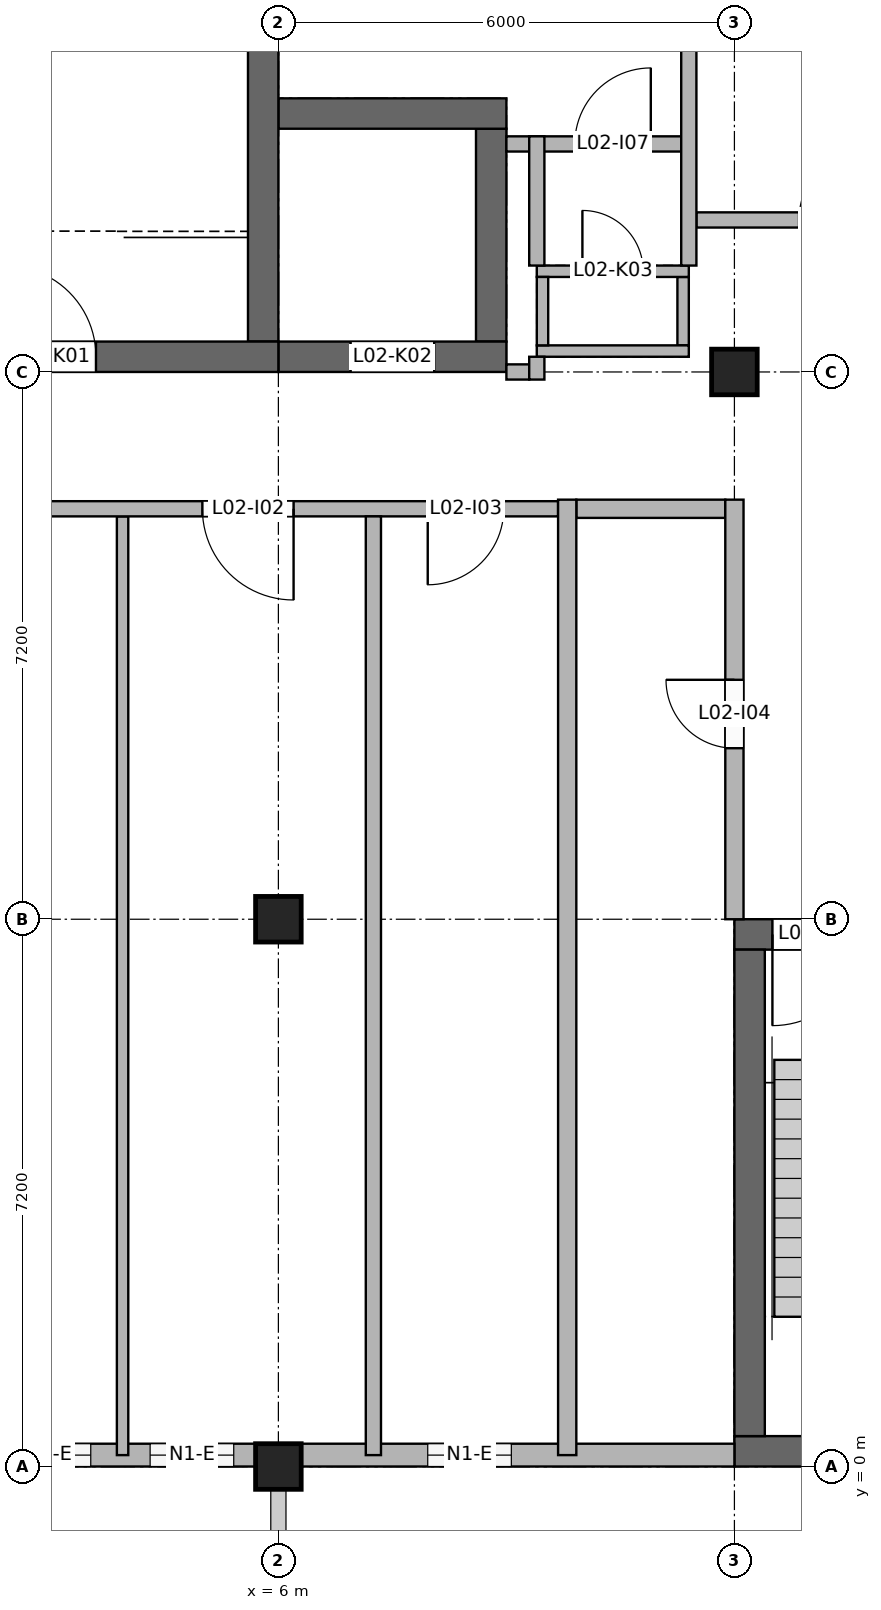
"""IFC4 building model, lengths in metres.
Left out: names, types, materials, properties, quantities, classifications, styles, units other than length and angle.
Written with IfcOpenShell. Run it as: python <this file> out.ifc"""

import sys

from ifc_helpers import new_model, si_unit, direction, frame, frame_2d, origin, origin_2d, place, context, subcontext, project, spatial, rectangle, extrude, element, fill, save


model = new_model("IFC4")
c1 = context("Model", 3, precision=1e-05, world=origin(), true_north=direction((0.0, 1.0)))
c2 = subcontext(c1, "Body", "Model", "MODEL_VIEW")
j1 = project(units=[si_unit("LENGTHUNIT", "METRE"), si_unit("PLANEANGLEUNIT", "RADIAN")], contexts=[c1])
p1 = place(None, origin())
s1 = spatial("IfcSite", under=j1, at=p1, CompositionType="ELEMENT")
p2 = place(p1, origin())
s2 = spatial("IfcBuilding", under=s1, at=p2, CompositionType="ELEMENT")
p3 = place(p2, frame((0.0, 0.0, 8.4)))
s3 = spatial("IfcBuildingStorey", under=s2, at=p3, CompositionType="ELEMENT", Elevation=8.4)
p4 = place(p3, frame((0.0, 14.6, 0.0), z_axis=(0.0, 0.0, 1.0), x_axis=(1.0, 0.0, 0.0)))
e1 = element("IfcWall", 1, at=p4, inside=s3, PredefinedType="SHEAR", context=c2, shape_type="SweptSolid", body=[
    extrude(rectangle(XDim=6.0, YDim=0.4, at=frame_2d((3.0, 0.0))), origin(), (0.0, 0.0, 1.0), 3.95),
])
p5 = place(p4, frame((2.4, 0.0, 0.0)))
e2 = element("IfcOpeningElement", 2, at=p5, cuts=e1, PredefinedType="OPENING", context=c2, shape_type="SweptSolid", body=[
    extrude(rectangle(XDim=1.2, YDim=2.1, at=frame_2d((0.6, 1.05))), frame((0.0, 0.21, 0.0), z_axis=(0.0, -1.0, 0.0), x_axis=(1.0, 0.0, 0.0)), (0.0, 0.0, 1.0), 0.42),
])
p6 = place(p3, frame((5.8, 14.8, 0.0), z_axis=(0.0, 0.0, 1.0), x_axis=(0.0, 1.0, 0.0)))
e3 = element("IfcWall", 3, at=p6, inside=s3, PredefinedType="SHEAR", context=c2, shape_type="SweptSolid", body=[
    extrude(rectangle(XDim=6.4, YDim=0.4, at=frame_2d((3.2, 0.0))), origin(), (0.0, 0.0, 1.0), 3.95),
])
p7 = place(p3, frame((6.0, 14.6, 0.0), z_axis=(0.0, 0.0, 1.0), x_axis=(1.0, 0.0, 0.0)))
e4 = element("IfcWall", 4, at=p7, inside=s3, PredefinedType="SHEAR", context=c2, shape_type="SweptSolid", body=[
    extrude(rectangle(XDim=3.0, YDim=0.4, at=frame_2d((1.5, 0.0))), origin(), (0.0, 0.0, 1.0), 5.75),
])
p8 = place(p7, frame((0.95, 0.0, 0.0)))
e5 = element("IfcOpeningElement", 5, at=p8, cuts=e4, PredefinedType="OPENING", context=c2, shape_type="SweptSolid", body=[
    extrude(rectangle(XDim=1.1, YDim=2.1, at=frame_2d((0.55, 1.05))), frame((0.0, 0.21, 0.0), z_axis=(0.0, -1.0, 0.0), x_axis=(1.0, 0.0, 0.0)), (0.0, 0.0, 1.0), 0.42),
])
p9 = place(p3, frame((6.0, 17.8, 0.0), z_axis=(0.0, 0.0, 1.0), x_axis=(1.0, 0.0, 0.0)))
e6 = element("IfcWall", 6, at=p9, inside=s3, PredefinedType="SHEAR", context=c2, shape_type="SweptSolid", body=[
    extrude(rectangle(XDim=3.0, YDim=0.4, at=frame_2d((1.5, 0.0))), origin(), (0.0, 0.0, 1.0), 5.75),
])
p10 = place(p3, frame((8.8, 14.8, 0.0), z_axis=(0.0, 0.0, 1.0), x_axis=(0.0, 1.0, 0.0)))
e7 = element("IfcWall", 7, at=p10, inside=s3, PredefinedType="SHEAR", context=c2, shape_type="SweptSolid", body=[
    extrude(rectangle(XDim=2.8, YDim=0.4, at=frame_2d((1.4, 0.0))), origin(), (0.0, 0.0, 1.0), 5.75),
])
p11 = place(p3, frame((12.0, 0.2, 0.0), z_axis=(0.0, 0.0, 1.0), x_axis=(1.0, 0.0, 0.0)))
e8 = element("IfcWall", 8, at=p11, inside=s3, PredefinedType="SHEAR", context=c2, shape_type="SweptSolid", body=[
    extrude(rectangle(XDim=5.0, YDim=0.4, at=frame_2d((2.5, 0.0))), origin(), (0.0, 0.0, 1.0), 3.95),
])
p12 = place(p3, frame((12.0, 7.0, 0.0), z_axis=(0.0, 0.0, 1.0), x_axis=(1.0, 0.0, 0.0)))
e9 = element("IfcWall", 9, at=p12, inside=s3, PredefinedType="SHEAR", context=c2, shape_type="SweptSolid", body=[
    extrude(rectangle(XDim=5.0, YDim=0.4, at=frame_2d((2.5, 0.0))), origin(), (0.0, 0.0, 1.0), 3.95),
])
p13 = place(p12, frame((0.5, 0.0, 0.0)))
e10 = element("IfcOpeningElement", 10, at=p13, cuts=e9, PredefinedType="OPENING", context=c2, shape_type="SweptSolid", body=[
    extrude(rectangle(XDim=1.2, YDim=2.1, at=frame_2d((0.6, 1.05))), frame((0.0, 0.21, 0.0), z_axis=(0.0, -1.0, 0.0), x_axis=(1.0, 0.0, 0.0)), (0.0, 0.0, 1.0), 0.42),
])
p14 = place(p3, frame((12.2, 0.4, 0.0), z_axis=(0.0, 0.0, 1.0), x_axis=(0.0, 1.0, 0.0)))
e11 = element("IfcWall", 11, at=p14, inside=s3, PredefinedType="SHEAR", context=c2, shape_type="SweptSolid", body=[
    extrude(rectangle(XDim=6.4, YDim=0.4, at=frame_2d((3.2, 0.0))), origin(), (0.0, 0.0, 1.0), 3.95),
])
p15 = place(p3, frame((9.4, 14.675, 0.0), z_axis=(0.0, 0.0, 1.0), x_axis=(1.0, 0.0, 0.0)))
e12 = element("IfcWall", 12, at=p15, inside=s3, PredefinedType="SOLIDWALL", context=c2, shape_type="SweptSolid", body=[
    extrude(rectangle(XDim=2.0, YDim=0.15, at=frame_2d((1.0, 0.0))), origin(), (0.0, 0.0, 1.0), 3.95),
])
p16 = place(p3, frame((9.4, 15.725, 0.0), z_axis=(0.0, 0.0, 1.0), x_axis=(1.0, 0.0, 0.0)))
e13 = element("IfcWall", 13, at=p16, inside=s3, PredefinedType="SOLIDWALL", context=c2, shape_type="SweptSolid", body=[
    extrude(rectangle(XDim=2.0, YDim=0.15, at=frame_2d((1.0, 0.0))), origin(), (0.0, 0.0, 1.0), 3.95),
])
p17 = place(p16, frame((0.6, 0.0, 0.0)))
e14 = element("IfcOpeningElement", 14, at=p17, cuts=e13, PredefinedType="OPENING", context=c2, shape_type="SweptSolid", body=[
    extrude(rectangle(XDim=0.8, YDim=2.1, at=frame_2d((0.4, 1.05))), frame((0.0, 0.085, 0.0), z_axis=(0.0, -1.0, 0.0), x_axis=(1.0, 0.0, 0.0)), (0.0, 0.0, 1.0), 0.17),
])
for number, where, z_axis, x_axis in (
    (15, (9.475, 14.75, 0.0), (0.0, 0.0, 1.0), (0.0, 1.0, 0.0)),
    (16, (11.325, 14.75, 0.0), (0.0, 0.0, 1.0), (0.0, 1.0, 0.0)),
):
    element("IfcWall", number, at=place(p3, frame(where, z_axis=z_axis, x_axis=x_axis)), inside=s3, PredefinedType="SOLIDWALL", context=c2, shape_type="SweptSolid", body=[
        extrude(rectangle(XDim=0.9, YDim=0.15, at=frame_2d((0.45, 0.0))), origin(), (0.0, 0.0, 1.0), 3.95),
    ])
for number, where, z_axis, x_axis in (
    (17, (6.0, 0.0, 0.0), (0.0, 0.0, 1.0), (1.0, 0.0, 0.0)),
    (18, (6.0, 7.2, 0.0), (0.0, 0.0, 1.0), (1.0, 0.0, 0.0)),
    (19, (12.0, 14.4, 0.0), (0.0, 0.0, 1.0), (1.0, 0.0, 0.0)),
):
    element("IfcColumn", number, at=place(p3, frame(where, z_axis=z_axis, x_axis=x_axis)), inside=s3, PredefinedType="COLUMN", context=c2, shape_type="SweptSolid", body=[
        extrude(rectangle(XDim=0.6, YDim=0.6, at=origin_2d()), origin(), (0.0, 0.0, 1.0), 3.95),
    ])
p18 = place(p3, frame((0.3, 0.15, 0.0), z_axis=(0.0, 0.0, 1.0), x_axis=(1.0, 0.0, 0.0)))
e20 = element("IfcWall", 20, at=p18, inside=s3, PredefinedType="SOLIDWALL", context=c2, shape_type="SweptSolid", body=[
    extrude(rectangle(XDim=5.4, YDim=0.3, at=frame_2d((2.7, 0.0))), origin(), (0.0, 0.0, 1.0), 3.15),
])
p19 = place(p18, frame((0.344, 0.0, 0.9)))
e21 = element("IfcOpeningElement", 21, at=p19, cuts=e20, PredefinedType="OPENING", context=c2, shape_type="SweptSolid", body=[
    extrude(rectangle(XDim=1.1, YDim=1.5, at=frame_2d((0.55, 0.75))), frame((0.0, 0.16, 0.0), z_axis=(0.0, -1.0, 0.0), x_axis=(1.0, 0.0, 0.0)), (0.0, 0.0, 1.0), 0.32),
])
p20 = place(p18, frame((2.131, 0.0, 0.9)))
e22 = element("IfcOpeningElement", 22, at=p20, cuts=e20, PredefinedType="OPENING", context=c2, shape_type="SweptSolid", body=[
    extrude(rectangle(XDim=1.1, YDim=1.5, at=frame_2d((0.55, 0.75))), frame((0.0, 0.16, 0.0), z_axis=(0.0, -1.0, 0.0), x_axis=(1.0, 0.0, 0.0)), (0.0, 0.0, 1.0), 0.32),
])
p21 = place(p18, frame((4.012, 0.0, 0.9)))
e23 = element("IfcOpeningElement", 23, at=p21, cuts=e20, PredefinedType="OPENING", context=c2, shape_type="SweptSolid", body=[
    extrude(rectangle(XDim=1.1, YDim=1.5, at=frame_2d((0.55, 0.75))), frame((0.0, 0.16, 0.0), z_axis=(0.0, -1.0, 0.0), x_axis=(1.0, 0.0, 0.0)), (0.0, 0.0, 1.0), 0.32),
])
p22 = place(p3, frame((6.3, 0.15, 0.0), z_axis=(0.0, 0.0, 1.0), x_axis=(1.0, 0.0, 0.0)))
e24 = element("IfcWall", 24, at=p22, inside=s3, PredefinedType="SOLIDWALL", context=c2, shape_type="SweptSolid", body=[
    extrude(rectangle(XDim=5.7, YDim=0.3, at=frame_2d((2.85, 0.0))), origin(), (0.0, 0.0, 1.0), 3.15),
])
p23 = place(p22, frame((1.665, 0.0, 0.9)))
e25 = element("IfcOpeningElement", 25, at=p23, cuts=e24, PredefinedType="OPENING", context=c2, shape_type="SweptSolid", body=[
    extrude(rectangle(XDim=1.1, YDim=1.5, at=frame_2d((0.55, 0.75))), frame((0.0, 0.16, 0.0), z_axis=(0.0, -1.0, 0.0), x_axis=(1.0, 0.0, 0.0)), (0.0, 0.0, 1.0), 0.32),
])
p24 = place(p3, frame((3.95, 0.15, 0.0), z_axis=(0.0, 0.0, 1.0), x_axis=(0.0, 1.0, 0.0)))
e26 = element("IfcWall", 26, at=p24, inside=s3, PredefinedType="PARTITIONING", context=c2, shape_type="SweptSolid", body=[
    extrude(rectangle(XDim=12.35, YDim=0.15, at=frame_2d((6.175, 0.0))), origin(), (0.0, 0.0, 1.0), 3.15),
])
p25 = place(p3, frame((7.25, 0.15, 0.0), z_axis=(0.0, 0.0, 1.0), x_axis=(0.0, 1.0, 0.0)))
e27 = element("IfcWall", 27, at=p25, inside=s3, PredefinedType="PARTITIONING", context=c2, shape_type="SweptSolid", body=[
    extrude(rectangle(XDim=12.35, YDim=0.2, at=frame_2d((6.175, 0.0))), origin(), (0.0, 0.0, 1.0), 3.15),
])
p26 = place(p3, frame((9.4, 14.3, 0.0), z_axis=(0.0, 0.0, 1.0), x_axis=(0.0, 1.0, 0.0)))
e28 = element("IfcWall", 28, at=p26, inside=s3, PredefinedType="PARTITIONING", context=c2, shape_type="SweptSolid", body=[
    extrude(rectangle(XDim=0.3, YDim=0.2, at=frame_2d((0.15, 0.0))), origin(), (0.0, 0.0, 1.0), 3.25),
])
p27 = place(p3, frame((9.4, 15.8, 0.0), z_axis=(0.0, 0.0, 1.0), x_axis=(0.0, 1.0, 0.0)))
e29 = element("IfcWall", 29, at=p27, inside=s3, PredefinedType="PARTITIONING", context=c2, shape_type="SweptSolid", body=[
    extrude(rectangle(XDim=1.7, YDim=0.2, at=frame_2d((0.85, 0.0))), origin(), (0.0, 0.0, 1.0), 3.95),
])
p28 = place(p3, frame((9.8, 0.15, 0.0), z_axis=(0.0, 0.0, 1.0), x_axis=(0.0, 1.0, 0.0)))
e30 = element("IfcWall", 30, at=p28, inside=s3, PredefinedType="PARTITIONING", context=c2, shape_type="SweptSolid", body=[
    extrude(rectangle(XDim=12.57, YDim=0.24, at=frame_2d((6.285, 0.0))), origin(), (0.0, 0.0, 1.0), 3.15),
])
p29 = place(p3, frame((11.4, 15.8, 0.0), z_axis=(0.0, 0.0, 1.0), x_axis=(0.0, 1.0, 0.0)))
e31 = element("IfcWall", 31, at=p29, inside=s3, PredefinedType="PARTITIONING", context=c2, shape_type="SweptSolid", body=[
    extrude(rectangle(XDim=5.65, YDim=0.2, at=frame_2d((2.825, 0.0))), origin(), (0.0, 0.0, 1.0), 3.95),
])
p30 = place(p3, frame((12.0, 7.2, 0.0), z_axis=(0.0, 0.0, 1.0), x_axis=(0.0, 1.0, 0.0)))
e32 = element("IfcWall", 32, at=p30, inside=s3, PredefinedType="PARTITIONING", context=c2, shape_type="SweptSolid", body=[
    extrude(rectangle(XDim=5.52, YDim=0.24, at=frame_2d((2.76, 0.0))), origin(), (0.0, 0.0, 1.0), 3.15),
])
p31 = place(p30, frame((2.25, 0.0, 0.0)))
e33 = element("IfcOpeningElement", 33, at=p31, cuts=e32, PredefinedType="OPENING", context=c2, shape_type="SweptSolid", body=[
    extrude(rectangle(XDim=0.9, YDim=2.1, at=frame_2d((0.45, 1.05))), frame((0.0, 0.13, 0.0), z_axis=(0.0, -1.0, 0.0), x_axis=(1.0, 0.0, 0.0)), (0.0, 0.0, 1.0), 0.26),
])
p32 = place(p3, frame((0.15, 12.6, 0.0), z_axis=(0.0, 0.0, 1.0), x_axis=(1.0, 0.0, 0.0)))
e34 = element("IfcWall", 34, at=p32, inside=s3, PredefinedType="PARTITIONING", context=c2, shape_type="SweptSolid", body=[
    extrude(rectangle(XDim=9.53, YDim=0.2, at=frame_2d((4.765, 0.0))), origin(), (0.0, 0.0, 1.0), 3.05),
])
p33 = place(p32, frame((1.3, 0.0, 0.0)))
e35 = element("IfcOpeningElement", 35, at=p33, cuts=e34, PredefinedType="OPENING", context=c2, shape_type="SweptSolid", body=[
    extrude(rectangle(XDim=1.2, YDim=2.1, at=frame_2d((0.6, 1.05))), frame((0.0, 0.11, 0.0), z_axis=(0.0, -1.0, 0.0), x_axis=(1.0, 0.0, 0.0)), (0.0, 0.0, 1.0), 0.22),
])
p34 = place(p32, frame((4.85, 0.0, 0.0)))
e36 = element("IfcOpeningElement", 36, at=p34, cuts=e34, PredefinedType="OPENING", context=c2, shape_type="SweptSolid", body=[
    extrude(rectangle(XDim=1.2, YDim=2.1, at=frame_2d((0.6, 1.05))), frame((0.0, 0.11, 0.0), z_axis=(0.0, -1.0, 0.0), x_axis=(1.0, 0.0, 0.0)), (0.0, 0.0, 1.0), 0.22),
])
p35 = place(p32, frame((7.815, 0.0, 0.0)))
e37 = element("IfcOpeningElement", 37, at=p35, cuts=e34, PredefinedType="OPENING", context=c2, shape_type="SweptSolid", body=[
    extrude(rectangle(XDim=1.0, YDim=2.1, at=frame_2d((0.5, 1.05))), frame((0.0, 0.11, 0.0), z_axis=(0.0, -1.0, 0.0), x_axis=(1.0, 0.0, 0.0)), (0.0, 0.0, 1.0), 0.22),
])
p36 = place(p3, frame((9.92, 12.6, 0.0), z_axis=(0.0, 0.0, 1.0), x_axis=(1.0, 0.0, 0.0)))
e38 = element("IfcWall", 38, at=p36, inside=s3, PredefinedType="PARTITIONING", context=c2, shape_type="SweptSolid", body=[
    extrude(rectangle(XDim=1.96, YDim=0.24, at=frame_2d((0.98, 0.0))), origin(), (0.0, 0.0, 1.0), 3.15),
])
p37 = place(p3, frame((9.0, 14.4, 0.0), z_axis=(0.0, 0.0, 1.0), x_axis=(1.0, 0.0, 0.0)))
e39 = element("IfcWall", 39, at=p37, inside=s3, PredefinedType="PARTITIONING", context=c2, shape_type="SweptSolid", body=[
    extrude(rectangle(XDim=0.3, YDim=0.2, at=frame_2d((0.15, 0.0))), origin(), (0.0, 0.0, 1.0), 3.25),
])
p38 = place(p3, frame((11.5, 16.4, 0.0), z_axis=(0.0, 0.0, 1.0), x_axis=(1.0, 0.0, 0.0)))
e40 = element("IfcWall", 40, at=p38, inside=s3, PredefinedType="PARTITIONING", context=c2, shape_type="SweptSolid", body=[
    extrude(rectangle(XDim=5.35, YDim=0.2, at=frame_2d((2.675, 0.0))), origin(), (0.0, 0.0, 1.0), 3.05),
])
p39 = place(p38, frame((1.35, 0.0, 0.0)))
e41 = element("IfcOpeningElement", 41, at=p39, cuts=e40, PredefinedType="OPENING", context=c2, shape_type="SweptSolid", body=[
    extrude(rectangle(XDim=1.0, YDim=2.1, at=frame_2d((0.5, 1.05))), frame((0.0, 0.11, 0.0), z_axis=(0.0, -1.0, 0.0), x_axis=(1.0, 0.0, 0.0)), (0.0, 0.0, 1.0), 0.22),
])
p40 = place(p38, frame((4.075, 0.0, 0.0)))
e42 = element("IfcOpeningElement", 42, at=p40, cuts=e40, PredefinedType="OPENING", context=c2, shape_type="SweptSolid", body=[
    extrude(rectangle(XDim=0.9, YDim=2.1, at=frame_2d((0.45, 1.05))), frame((0.0, 0.11, 0.0), z_axis=(0.0, -1.0, 0.0), x_axis=(1.0, 0.0, 0.0)), (0.0, 0.0, 1.0), 0.22),
])
p41 = place(p3, frame((9.0, 17.4, 0.0), z_axis=(0.0, 0.0, 1.0), x_axis=(1.0, 0.0, 0.0)))
e43 = element("IfcWall", 43, at=p41, inside=s3, PredefinedType="PARTITIONING", context=c2, shape_type="SweptSolid", body=[
    extrude(rectangle(XDim=2.3, YDim=0.2, at=frame_2d((1.15, 0.0))), origin(), (0.0, 0.0, 1.0), 3.95),
])
p42 = place(p41, frame((0.9, 0.0, 0.0)))
e44 = element("IfcOpeningElement", 44, at=p42, cuts=e43, PredefinedType="OPENING", context=c2, shape_type="SweptSolid", body=[
    extrude(rectangle(XDim=1.0, YDim=2.1, at=frame_2d((0.5, 1.05))), frame((0.0, 0.11, 0.0), z_axis=(0.0, -1.0, 0.0), x_axis=(1.0, 0.0, 0.0)), (0.0, 0.0, 1.0), 0.22),
])
p43 = place(p20, origin())
e45 = element("IfcWindow", 45, at=p43, inside=s3, PartitioningType="SINGLE_PANEL", PredefinedType="WINDOW", context=c2, shape_type="SweptSolid", body=[
    extrude(rectangle(XDim=1.1, YDim=1.5, at=frame_2d((0.55, 0.75))), frame((0.0, 0.03, 0.0), z_axis=(0.0, -1.0, 0.0), x_axis=(1.0, 0.0, 0.0)), (0.0, 0.0, 1.0), 0.06),
])
fill(e22, e45)
p44 = place(p21, origin())
e46 = element("IfcWindow", 46, at=p44, inside=s3, PartitioningType="SINGLE_PANEL", PredefinedType="WINDOW", context=c2, shape_type="SweptSolid", body=[
    extrude(rectangle(XDim=1.1, YDim=1.5, at=frame_2d((0.55, 0.75))), frame((0.0, 0.03, 0.0), z_axis=(0.0, -1.0, 0.0), x_axis=(1.0, 0.0, 0.0)), (0.0, 0.0, 1.0), 0.06),
])
fill(e23, e46)
p45 = place(p23, origin())
e47 = element("IfcWindow", 47, at=p45, inside=s3, PartitioningType="SINGLE_PANEL", PredefinedType="WINDOW", context=c2, shape_type="SweptSolid", body=[
    extrude(rectangle(XDim=1.1, YDim=1.5, at=frame_2d((0.55, 0.75))), frame((0.0, 0.03, 0.0), z_axis=(0.0, -1.0, 0.0), x_axis=(1.0, 0.0, 0.0)), (0.0, 0.0, 1.0), 0.06),
])
fill(e25, e47)
p46 = place(p5, origin())
e48 = element("IfcDoor", 48, at=p46, inside=s3, OperationType="SINGLE_SWING_LEFT", PredefinedType="DOOR", context=c2, shape_type="SweptSolid", body=[
    extrude(rectangle(XDim=1.2, YDim=2.1, at=frame_2d((0.6, 1.05))), frame((0.0, 0.025, 0.0), z_axis=(0.0, -1.0, 0.0), x_axis=(1.0, 0.0, 0.0)), (0.0, 0.0, 1.0), 0.05),
])
fill(e2, e48)
p47 = place(p8, origin())
e49 = element("IfcDoor", 49, at=p47, inside=s3, OperationType="DOUBLE_DOOR_SLIDING", PredefinedType="DOOR", context=c2, shape_type="SweptSolid", body=[
    extrude(rectangle(XDim=1.1, YDim=2.1, at=frame_2d((0.55, 1.05))), frame((0.0, 0.025, 0.0), z_axis=(0.0, -1.0, 0.0), x_axis=(1.0, 0.0, 0.0)), (0.0, 0.0, 1.0), 0.05),
])
fill(e5, e49)
p48 = place(p17, origin())
e50 = element("IfcDoor", 50, at=p48, inside=s3, OperationType="SINGLE_SWING_LEFT", PredefinedType="DOOR", context=c2, shape_type="SweptSolid", body=[
    extrude(rectangle(XDim=0.8, YDim=2.1, at=frame_2d((0.4, 1.05))), frame((0.0, 0.025, 0.0), z_axis=(0.0, -1.0, 0.0), x_axis=(1.0, 0.0, 0.0)), (0.0, 0.0, 1.0), 0.05),
])
fill(e14, e50)
p49 = place(p13, frame((1.2, 0.0, 0.0), z_axis=(0.0, 0.0, 1.0), x_axis=(-1.0, 0.0, 0.0)))
e51 = element("IfcDoor", 51, at=p49, inside=s3, OperationType="SINGLE_SWING_RIGHT", PredefinedType="DOOR", context=c2, shape_type="SweptSolid", body=[
    extrude(rectangle(XDim=1.2, YDim=2.1, at=frame_2d((0.6, 1.05))), frame((0.0, 0.025, 0.0), z_axis=(0.0, -1.0, 0.0), x_axis=(1.0, 0.0, 0.0)), (0.0, 0.0, 1.0), 0.05),
])
fill(e10, e51)
p50 = place(p34, frame((1.2, 0.0, 0.0), z_axis=(0.0, 0.0, 1.0), x_axis=(-1.0, 0.0, 0.0)))
e52 = element("IfcDoor", 52, at=p50, inside=s3, OperationType="SINGLE_SWING_LEFT", PredefinedType="DOOR", context=c2, shape_type="SweptSolid", body=[
    extrude(rectangle(XDim=1.2, YDim=2.1, at=frame_2d((0.6, 1.05))), frame((0.0, 0.025, 0.0), z_axis=(0.0, -1.0, 0.0), x_axis=(1.0, 0.0, 0.0)), (0.0, 0.0, 1.0), 0.05),
])
fill(e36, e52)
p51 = place(p35, frame((1.0, 0.0, 0.0), z_axis=(0.0, 0.0, 1.0), x_axis=(-1.0, 0.0, 0.0)))
e53 = element("IfcDoor", 53, at=p51, inside=s3, OperationType="SINGLE_SWING_RIGHT", PredefinedType="DOOR", context=c2, shape_type="SweptSolid", body=[
    extrude(rectangle(XDim=1.0, YDim=2.1, at=frame_2d((0.5, 1.05))), frame((0.0, 0.025, 0.0), z_axis=(0.0, -1.0, 0.0), x_axis=(1.0, 0.0, 0.0)), (0.0, 0.0, 1.0), 0.05),
])
fill(e37, e53)
p52 = place(p31, origin())
e54 = element("IfcDoor", 54, at=p52, inside=s3, OperationType="SINGLE_SWING_RIGHT", PredefinedType="DOOR", context=c2, shape_type="SweptSolid", body=[
    extrude(rectangle(XDim=0.9, YDim=2.1, at=frame_2d((0.45, 1.05))), frame((0.0, 0.025, 0.0), z_axis=(0.0, -1.0, 0.0), x_axis=(1.0, 0.0, 0.0)), (0.0, 0.0, 1.0), 0.05),
])
fill(e33, e54)
p53 = place(p39, origin())
e55 = element("IfcDoor", 55, at=p53, inside=s3, OperationType="SINGLE_SWING_RIGHT", PredefinedType="DOOR", context=c2, shape_type="SweptSolid", body=[
    extrude(rectangle(XDim=1.0, YDim=2.1, at=frame_2d((0.5, 1.05))), frame((0.0, 0.025, 0.0), z_axis=(0.0, -1.0, 0.0), x_axis=(1.0, 0.0, 0.0)), (0.0, 0.0, 1.0), 0.05),
])
fill(e41, e55)
p54 = place(p42, origin())
e56 = element("IfcDoor", 56, at=p54, inside=s3, OperationType="SINGLE_SWING_RIGHT", PredefinedType="DOOR", context=c2, shape_type="SweptSolid", body=[
    extrude(rectangle(XDim=1.0, YDim=2.1, at=frame_2d((0.5, 1.05))), frame((0.0, 0.025, 0.0), z_axis=(0.0, -1.0, 0.0), x_axis=(1.0, 0.0, 0.0)), (0.0, 0.0, 1.0), 0.05),
])
fill(e44, e56)
save(model, sys.argv[1])
